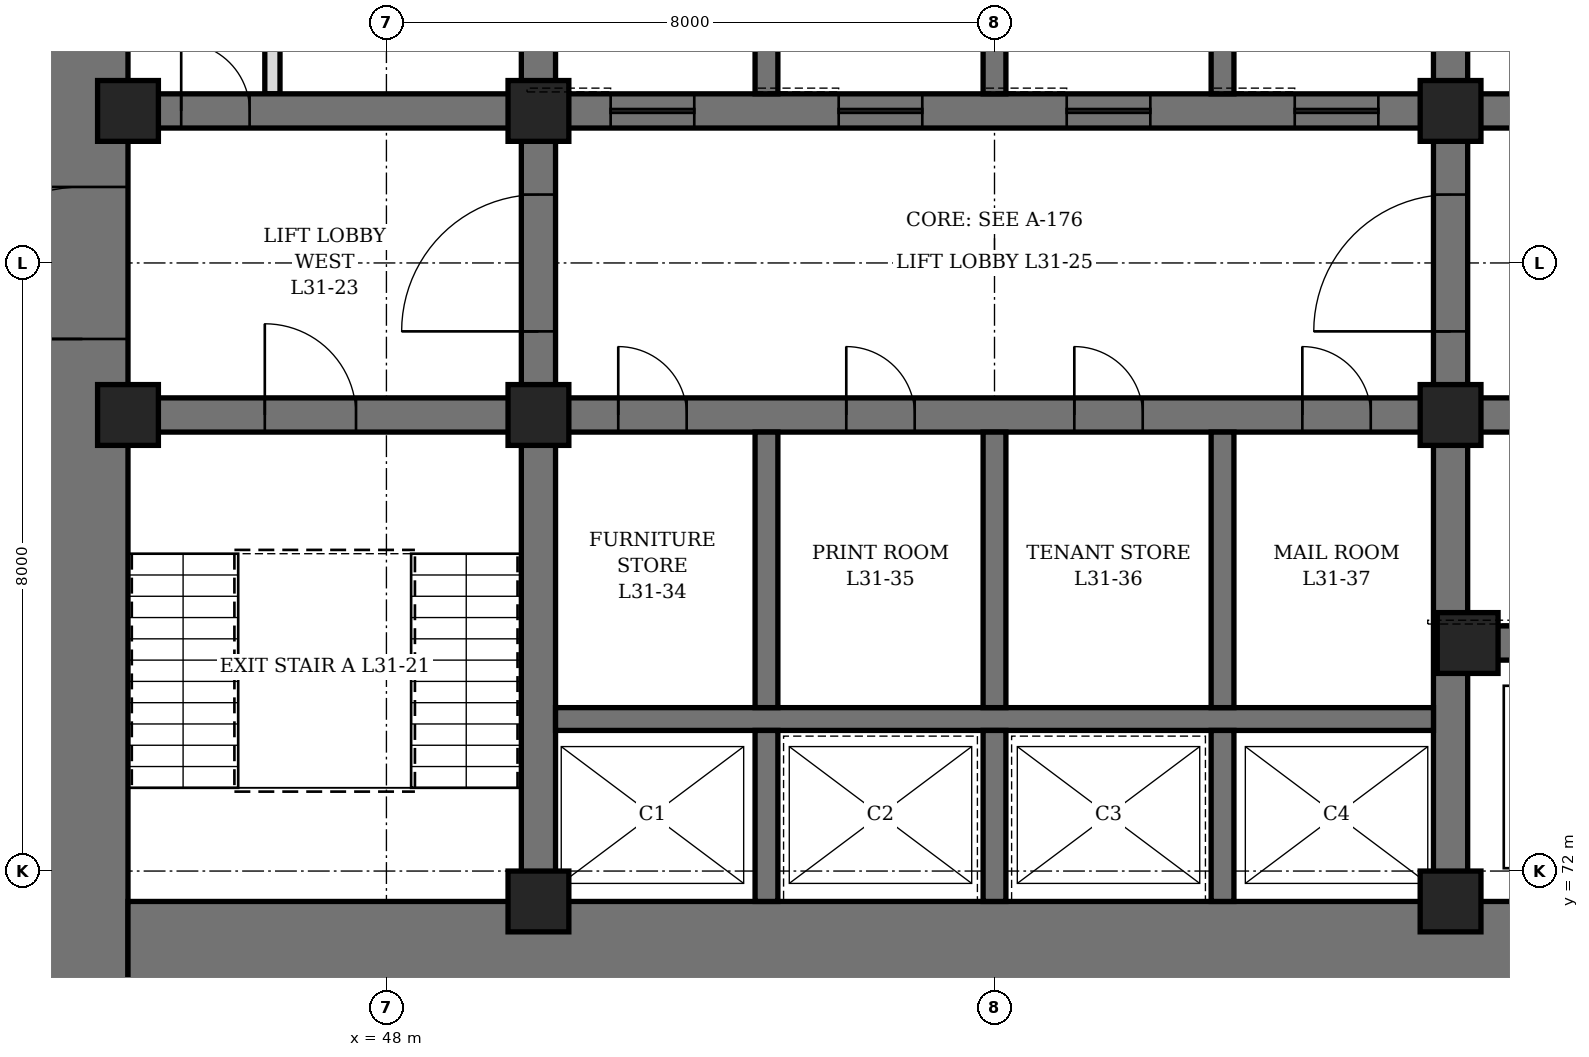
"""IFC4 building model, lengths in metres.
Left out: names, types, materials, properties, quantities, classifications, styles, units other than length and angle.
Written with IfcOpenShell. Run it as: python <this file> out.ifc"""

import sys

from ifc_helpers import new_model, si_unit, direction, frame, frame_2d, origin, origin_2d, place, context, subcontext, project, spatial, rectangle, hollow_rectangle, extrude, element, fill, save


model = new_model("IFC4")
c1 = context("Model", 3, precision=1e-05, world=origin(), true_north=direction((0.0, 1.0)))
c2 = subcontext(c1, "Body", "Model", "MODEL_VIEW")
j1 = project(units=[si_unit("LENGTHUNIT", "METRE"), si_unit("PLANEANGLEUNIT", "RADIAN")], contexts=[c1])
p1 = place(None, origin())
s1 = spatial("IfcSite", under=j1, at=p1, CompositionType="ELEMENT")
p2 = place(p1, origin())
s2 = spatial("IfcBuilding", under=s1, at=p2, CompositionType="ELEMENT")
p3 = place(p2, frame((0.0, 0.0, 141.7)))
s3 = spatial("IfcBuildingStorey", under=s2, at=p3, CompositionType="ELEMENT", Elevation=141.7)
p4 = place(p3, frame((44.0, 70.4, 0.0), z_axis=(0.0, 0.0, 1.0), x_axis=(0.0, 1.0, 0.0)))
e1 = element("IfcWall", 1, at=p4, inside=s3, PredefinedType="SHEAR", context=c2, shape_type="SweptSolid", body=[
    extrude(rectangle(XDim=19.2, YDim=1.2, at=frame_2d((9.6, 0.0))), origin(), (0.0, 0.0, 1.0), 4.2),
])
p5 = place(p4, frame((8.6, 0.0, 0.0)))
e2 = element("IfcOpeningElement", 2, at=p5, cuts=e1, PredefinedType="OPENING", context=c2, shape_type="SweptSolid", body=[
    extrude(rectangle(XDim=2.0, YDim=2.4, at=frame_2d((1.0, 1.2))), frame((0.0, 0.61, 0.0), z_axis=(0.0, -1.0, 0.0), x_axis=(1.0, 0.0, 0.0)), (0.0, 0.0, 1.0), 1.22),
])
p6 = place(p3, frame((44.6, 71.0, 0.0), z_axis=(0.0, 0.0, 1.0), x_axis=(1.0, 0.0, 0.0)))
e3 = element("IfcWall", 3, at=p6, inside=s3, PredefinedType="SHEAR", context=c2, shape_type="SweptSolid", body=[
    extrude(rectangle(XDim=22.8, YDim=1.2, at=frame_2d((11.4, 0.0))), origin(), (0.0, 0.0, 1.0), 4.2),
])
p7 = place(p3, frame((50.0, 71.6, 0.0), z_axis=(0.0, 0.0, 1.0), x_axis=(0.0, 1.0, 0.0)))
e4 = element("IfcWall", 4, at=p7, inside=s3, PredefinedType="SHEAR", context=c2, shape_type="SweptSolid", body=[
    extrude(rectangle(XDim=16.8, YDim=0.45, at=frame_2d((8.4, 0.0))), origin(), (0.0, 0.0, 1.0), 4.2),
])
p8 = place(p7, frame((7.5, 0.0, 0.0)))
e5 = element("IfcOpeningElement", 5, at=p8, cuts=e4, PredefinedType="OPENING", context=c2, shape_type="SweptSolid", body=[
    extrude(rectangle(XDim=1.8, YDim=2.4, at=frame_2d((0.9, 1.2))), frame((0.0, 0.235, 0.0), z_axis=(0.0, -1.0, 0.0), x_axis=(1.0, 0.0, 0.0)), (0.0, 0.0, 1.0), 0.47),
])
p9 = place(p3, frame((62.0, 71.6, 0.0), z_axis=(0.0, 0.0, 1.0), x_axis=(0.0, 1.0, 0.0)))
e6 = element("IfcWall", 6, at=p9, inside=s3, PredefinedType="SHEAR", context=c2, shape_type="SweptSolid", body=[
    extrude(rectangle(XDim=16.8, YDim=0.45, at=frame_2d((8.4, 0.0))), origin(), (0.0, 0.0, 1.0), 4.2),
])
p10 = place(p9, frame((7.5, 0.0, 0.0)))
e7 = element("IfcOpeningElement", 7, at=p10, cuts=e6, PredefinedType="OPENING", context=c2, shape_type="SweptSolid", body=[
    extrude(rectangle(XDim=1.8, YDim=2.4, at=frame_2d((0.9, 1.2))), frame((0.0, 0.235, 0.0), z_axis=(0.0, -1.0, 0.0), x_axis=(1.0, 0.0, 0.0)), (0.0, 0.0, 1.0), 0.47),
])
p11 = place(p3, frame((44.6, 78.0, 0.0), z_axis=(0.0, 0.0, 1.0), x_axis=(1.0, 0.0, 0.0)))
e8 = element("IfcWall", 8, at=p11, inside=s3, PredefinedType="SHEAR", context=c2, shape_type="SweptSolid", body=[
    extrude(rectangle(XDim=5.175, YDim=0.45, at=frame_2d((2.587, 0.0))), origin(), (0.0, 0.0, 1.0), 4.2),
])
p12 = place(p11, frame((1.8, 0.0, 0.0)))
e9 = element("IfcOpeningElement", 9, at=p12, cuts=e8, PredefinedType="OPENING", context=c2, shape_type="SweptSolid", body=[
    extrude(rectangle(XDim=1.2, YDim=2.1, at=frame_2d((0.6, 1.05))), frame((0.0, 0.235, 0.0), z_axis=(0.0, -1.0, 0.0), x_axis=(1.0, 0.0, 0.0)), (0.0, 0.0, 1.0), 0.47),
])
p13 = place(p3, frame((44.6, 82.0, 0.0), z_axis=(0.0, 0.0, 1.0), x_axis=(1.0, 0.0, 0.0)))
e10 = element("IfcWall", 10, at=p13, inside=s3, PredefinedType="SHEAR", context=c2, shape_type="SweptSolid", body=[
    extrude(rectangle(XDim=5.175, YDim=0.45, at=frame_2d((2.587, 0.0))), origin(), (0.0, 0.0, 1.0), 4.2),
])
p14 = place(p13, frame((0.7, 0.0, 0.0)))
e11 = element("IfcOpeningElement", 11, at=p14, cuts=e10, PredefinedType="OPENING", context=c2, shape_type="SweptSolid", body=[
    extrude(rectangle(XDim=0.9, YDim=2.1, at=frame_2d((0.45, 1.05))), frame((0.0, 0.235, 0.0), z_axis=(0.0, -1.0, 0.0), x_axis=(1.0, 0.0, 0.0)), (0.0, 0.0, 1.0), 0.47),
])
p15 = place(p3, frame((62.225, 75.0, 0.0), z_axis=(0.0, 0.0, 1.0), x_axis=(1.0, 0.0, 0.0)))
e12 = element("IfcWall", 12, at=p15, inside=s3, PredefinedType="SHEAR", context=c2, shape_type="SweptSolid", body=[
    extrude(rectangle(XDim=5.175, YDim=0.45, at=frame_2d((2.587, 0.0))), origin(), (0.0, 0.0, 1.0), 4.2),
])
p16 = place(p15, frame((0.675, 0.0, 0.0)))
e13 = element("IfcOpeningElement", 13, at=p16, cuts=e12, PredefinedType="OPENING", context=c2, shape_type="SweptSolid", body=[
    extrude(rectangle(XDim=1.2, YDim=2.2, at=frame_2d((0.6, 1.1))), frame((0.0, 0.235, 0.0), z_axis=(0.0, -1.0, 0.0), x_axis=(1.0, 0.0, 0.0)), (0.0, 0.0, 1.0), 0.47),
])
p17 = place(p15, frame((3.425, 0.0, 0.0)))
e14 = element("IfcOpeningElement", 14, at=p17, cuts=e12, PredefinedType="OPENING", context=c2, shape_type="SweptSolid", body=[
    extrude(rectangle(XDim=1.2, YDim=2.2, at=frame_2d((0.6, 1.1))), frame((0.0, 0.235, 0.0), z_axis=(0.0, -1.0, 0.0), x_axis=(1.0, 0.0, 0.0)), (0.0, 0.0, 1.0), 0.47),
])
p18 = place(p3, frame((62.225, 78.0, 0.0), z_axis=(0.0, 0.0, 1.0), x_axis=(1.0, 0.0, 0.0)))
e15 = element("IfcWall", 15, at=p18, inside=s3, PredefinedType="SHEAR", context=c2, shape_type="SweptSolid", body=[
    extrude(rectangle(XDim=5.175, YDim=0.45, at=frame_2d((2.587, 0.0))), origin(), (0.0, 0.0, 1.0), 4.2),
])
p19 = place(p18, frame((2.175, 0.0, 0.0)))
e16 = element("IfcOpeningElement", 16, at=p19, cuts=e15, PredefinedType="OPENING", context=c2, shape_type="SweptSolid", body=[
    extrude(rectangle(XDim=1.2, YDim=2.1, at=frame_2d((0.6, 1.05))), frame((0.0, 0.235, 0.0), z_axis=(0.0, -1.0, 0.0), x_axis=(1.0, 0.0, 0.0)), (0.0, 0.0, 1.0), 0.47),
])
p20 = place(p3, frame((62.225, 82.0, 0.0), z_axis=(0.0, 0.0, 1.0), x_axis=(1.0, 0.0, 0.0)))
e17 = element("IfcWall", 17, at=p20, inside=s3, PredefinedType="SHEAR", context=c2, shape_type="SweptSolid", body=[
    extrude(rectangle(XDim=5.175, YDim=0.45, at=frame_2d((2.587, 0.0))), origin(), (0.0, 0.0, 1.0), 4.2),
])
p21 = place(p20, frame((2.175, 0.0, 0.0)))
e18 = element("IfcOpeningElement", 18, at=p21, cuts=e17, PredefinedType="OPENING", context=c2, shape_type="SweptSolid", body=[
    extrude(rectangle(XDim=1.2, YDim=2.1, at=frame_2d((0.6, 1.05))), frame((0.0, 0.235, 0.0), z_axis=(0.0, -1.0, 0.0), x_axis=(1.0, 0.0, 0.0)), (0.0, 0.0, 1.0), 0.47),
])
p22 = place(p3, frame((50.225, 78.0, 0.0), z_axis=(0.0, 0.0, 1.0), x_axis=(1.0, 0.0, 0.0)))
e19 = element("IfcWall", 19, at=p22, inside=s3, PredefinedType="SHEAR", context=c2, shape_type="SweptSolid", body=[
    extrude(rectangle(XDim=11.55, YDim=0.45, at=frame_2d((5.775, 0.0))), origin(), (0.0, 0.0, 1.0), 4.2),
])
p23 = place(p22, frame((0.825, 0.0, 0.0)))
e20 = element("IfcOpeningElement", 20, at=p23, cuts=e19, PredefinedType="OPENING", context=c2, shape_type="SweptSolid", body=[
    extrude(rectangle(XDim=0.9, YDim=2.1, at=frame_2d((0.45, 1.05))), frame((0.0, 0.235, 0.0), z_axis=(0.0, -1.0, 0.0), x_axis=(1.0, 0.0, 0.0)), (0.0, 0.0, 1.0), 0.47),
])
p24 = place(p22, frame((3.825, 0.0, 0.0)))
e21 = element("IfcOpeningElement", 21, at=p24, cuts=e19, PredefinedType="OPENING", context=c2, shape_type="SweptSolid", body=[
    extrude(rectangle(XDim=0.9, YDim=2.1, at=frame_2d((0.45, 1.05))), frame((0.0, 0.235, 0.0), z_axis=(0.0, -1.0, 0.0), x_axis=(1.0, 0.0, 0.0)), (0.0, 0.0, 1.0), 0.47),
])
p25 = place(p22, frame((6.825, 0.0, 0.0)))
e22 = element("IfcOpeningElement", 22, at=p25, cuts=e19, PredefinedType="OPENING", context=c2, shape_type="SweptSolid", body=[
    extrude(rectangle(XDim=0.9, YDim=2.1, at=frame_2d((0.45, 1.05))), frame((0.0, 0.235, 0.0), z_axis=(0.0, -1.0, 0.0), x_axis=(1.0, 0.0, 0.0)), (0.0, 0.0, 1.0), 0.47),
])
p26 = place(p22, frame((9.825, 0.0, 0.0)))
e23 = element("IfcOpeningElement", 23, at=p26, cuts=e19, PredefinedType="OPENING", context=c2, shape_type="SweptSolid", body=[
    extrude(rectangle(XDim=0.9, YDim=2.1, at=frame_2d((0.45, 1.05))), frame((0.0, 0.235, 0.0), z_axis=(0.0, -1.0, 0.0), x_axis=(1.0, 0.0, 0.0)), (0.0, 0.0, 1.0), 0.47),
])
p27 = place(p3, frame((50.225, 82.0, 0.0), z_axis=(0.0, 0.0, 1.0), x_axis=(1.0, 0.0, 0.0)))
e24 = element("IfcWall", 24, at=p27, inside=s3, PredefinedType="SHEAR", context=c2, shape_type="SweptSolid", body=[
    extrude(rectangle(XDim=11.55, YDim=0.45, at=frame_2d((5.775, 0.0))), origin(), (0.0, 0.0, 1.0), 4.2),
])
p28 = place(p27, frame((0.725, 0.0, 0.0)))
e25 = element("IfcOpeningElement", 25, at=p28, cuts=e24, PredefinedType="OPENING", context=c2, shape_type="SweptSolid", body=[
    extrude(rectangle(XDim=1.1, YDim=2.2, at=frame_2d((0.55, 1.1))), frame((0.0, 0.235, 0.0), z_axis=(0.0, -1.0, 0.0), x_axis=(1.0, 0.0, 0.0)), (0.0, 0.0, 1.0), 0.47),
])
p29 = place(p27, frame((3.725, 0.0, 0.0)))
e26 = element("IfcOpeningElement", 26, at=p29, cuts=e24, PredefinedType="OPENING", context=c2, shape_type="SweptSolid", body=[
    extrude(rectangle(XDim=1.1, YDim=2.2, at=frame_2d((0.55, 1.1))), frame((0.0, 0.235, 0.0), z_axis=(0.0, -1.0, 0.0), x_axis=(1.0, 0.0, 0.0)), (0.0, 0.0, 1.0), 0.47),
])
p30 = place(p27, frame((6.725, 0.0, 0.0)))
e27 = element("IfcOpeningElement", 27, at=p30, cuts=e24, PredefinedType="OPENING", context=c2, shape_type="SweptSolid", body=[
    extrude(rectangle(XDim=1.1, YDim=2.2, at=frame_2d((0.55, 1.1))), frame((0.0, 0.235, 0.0), z_axis=(0.0, -1.0, 0.0), x_axis=(1.0, 0.0, 0.0)), (0.0, 0.0, 1.0), 0.47),
])
p31 = place(p27, frame((9.725, 0.0, 0.0)))
e28 = element("IfcOpeningElement", 28, at=p31, cuts=e24, PredefinedType="OPENING", context=c2, shape_type="SweptSolid", body=[
    extrude(rectangle(XDim=1.1, YDim=2.2, at=frame_2d((0.55, 1.1))), frame((0.0, 0.235, 0.0), z_axis=(0.0, -1.0, 0.0), x_axis=(1.0, 0.0, 0.0)), (0.0, 0.0, 1.0), 0.47),
])
p32 = place(p3, frame((50.225, 74.0, 0.0), z_axis=(0.0, 0.0, 1.0), x_axis=(1.0, 0.0, 0.0)))
e29 = element("IfcWall", 29, at=p32, inside=s3, PredefinedType="SHEAR", context=c2, shape_type="SweptSolid", body=[
    extrude(rectangle(XDim=11.55, YDim=0.3, at=frame_2d((5.775, 0.0))), origin(), (0.0, 0.0, 1.0), 4.2),
])
p33 = place(p3, frame((53.0, 71.6, 0.0), z_axis=(0.0, 0.0, 1.0), x_axis=(0.0, 1.0, 0.0)))
e30 = element("IfcWall", 30, at=p33, inside=s3, PredefinedType="SHEAR", context=c2, shape_type="SweptSolid", body=[
    extrude(rectangle(XDim=2.25, YDim=0.3, at=frame_2d((1.125, 0.0))), origin(), (0.0, 0.0, 1.0), 4.2),
])
p34 = place(p3, frame((53.0, 74.15, 0.0), z_axis=(0.0, 0.0, 1.0), x_axis=(0.0, 1.0, 0.0)))
e31 = element("IfcWall", 31, at=p34, inside=s3, PredefinedType="SHEAR", context=c2, shape_type="SweptSolid", body=[
    extrude(rectangle(XDim=3.625, YDim=0.3, at=frame_2d((1.812, 0.0))), origin(), (0.0, 0.0, 1.0), 4.2),
])
p35 = place(p3, frame((53.0, 82.225, 0.0), z_axis=(0.0, 0.0, 1.0), x_axis=(0.0, 1.0, 0.0)))
e32 = element("IfcWall", 32, at=p35, inside=s3, PredefinedType="SHEAR", context=c2, shape_type="SweptSolid", body=[
    extrude(rectangle(XDim=3.55, YDim=0.3, at=frame_2d((1.775, 0.0))), origin(), (0.0, 0.0, 1.0), 4.2),
])
p36 = place(p3, frame((56.0, 71.6, 0.0), z_axis=(0.0, 0.0, 1.0), x_axis=(0.0, 1.0, 0.0)))
e33 = element("IfcWall", 33, at=p36, inside=s3, PredefinedType="SHEAR", context=c2, shape_type="SweptSolid", body=[
    extrude(rectangle(XDim=2.25, YDim=0.3, at=frame_2d((1.125, 0.0))), origin(), (0.0, 0.0, 1.0), 4.2),
])
p37 = place(p3, frame((56.0, 74.15, 0.0), z_axis=(0.0, 0.0, 1.0), x_axis=(0.0, 1.0, 0.0)))
e34 = element("IfcWall", 34, at=p37, inside=s3, PredefinedType="SHEAR", context=c2, shape_type="SweptSolid", body=[
    extrude(rectangle(XDim=3.625, YDim=0.3, at=frame_2d((1.812, 0.0))), origin(), (0.0, 0.0, 1.0), 4.2),
])
p38 = place(p3, frame((56.0, 82.225, 0.0), z_axis=(0.0, 0.0, 1.0), x_axis=(0.0, 1.0, 0.0)))
e35 = element("IfcWall", 35, at=p38, inside=s3, PredefinedType="SHEAR", context=c2, shape_type="SweptSolid", body=[
    extrude(rectangle(XDim=3.55, YDim=0.3, at=frame_2d((1.775, 0.0))), origin(), (0.0, 0.0, 1.0), 4.2),
])
p39 = place(p3, frame((59.0, 71.6, 0.0), z_axis=(0.0, 0.0, 1.0), x_axis=(0.0, 1.0, 0.0)))
e36 = element("IfcWall", 36, at=p39, inside=s3, PredefinedType="SHEAR", context=c2, shape_type="SweptSolid", body=[
    extrude(rectangle(XDim=2.25, YDim=0.3, at=frame_2d((1.125, 0.0))), origin(), (0.0, 0.0, 1.0), 4.2),
])
p40 = place(p3, frame((59.0, 74.15, 0.0), z_axis=(0.0, 0.0, 1.0), x_axis=(0.0, 1.0, 0.0)))
e37 = element("IfcWall", 37, at=p40, inside=s3, PredefinedType="SHEAR", context=c2, shape_type="SweptSolid", body=[
    extrude(rectangle(XDim=3.625, YDim=0.3, at=frame_2d((1.812, 0.0))), origin(), (0.0, 0.0, 1.0), 4.2),
])
p41 = place(p3, frame((59.0, 82.225, 0.0), z_axis=(0.0, 0.0, 1.0), x_axis=(0.0, 1.0, 0.0)))
e38 = element("IfcWall", 38, at=p41, inside=s3, PredefinedType="SHEAR", context=c2, shape_type="SweptSolid", body=[
    extrude(rectangle(XDim=3.55, YDim=0.3, at=frame_2d((1.775, 0.0))), origin(), (0.0, 0.0, 1.0), 4.2),
])
for number, where, z_axis, x_axis in (
    (39, (44.6, 78.0, 0.0), (0.0, 0.0, 1.0), (1.0, 0.0, 0.0)),
    (40, (44.6, 82.0, 0.0), (0.0, 0.0, 1.0), (1.0, 0.0, 0.0)),
    (41, (50.0, 71.6, 0.0), (0.0, 0.0, 1.0), (1.0, 0.0, 0.0)),
    (42, (50.0, 78.0, 0.0), (0.0, 0.0, 1.0), (1.0, 0.0, 0.0)),
    (43, (50.0, 82.0, 0.0), (0.0, 0.0, 1.0), (1.0, 0.0, 0.0)),
    (44, (62.0, 71.6, 0.0), (0.0, 0.0, 1.0), (1.0, 0.0, 0.0)),
    (45, (62.0, 78.0, 0.0), (0.0, 0.0, 1.0), (1.0, 0.0, 0.0)),
    (46, (62.0, 82.0, 0.0), (0.0, 0.0, 1.0), (1.0, 0.0, 0.0)),
    (47, (62.225, 75.0, 0.0), (0.0, 0.0, 1.0), (1.0, 0.0, 0.0)),
):
    element("IfcColumn", number, at=place(p3, frame(where, z_axis=z_axis, x_axis=x_axis)), inside=s3, PredefinedType="COLUMN", context=c2, shape_type="SweptSolid", body=[
        extrude(hollow_rectangle(XDim=0.8, YDim=0.8, WallThickness=0.1, at=origin_2d()), origin(), (0.0, 0.0, 1.0), 4.2),
    ])
p42 = place(p3, frame((46.5, 82.225, 0.0), z_axis=(0.0, 0.0, 1.0), x_axis=(0.0, 1.0, 0.0)))
e48 = element("IfcWall", 48, at=p42, inside=s3, PredefinedType="PARTITIONING", context=c2, shape_type="SweptSolid", body=[
    extrude(rectangle(XDim=3.05, YDim=0.2, at=frame_2d((1.525, 0.0))), origin(), (0.0, 0.0, 1.0), 4.04),
])
p43 = place(p42, frame((1.075, 0.0, 0.0)))
e49 = element("IfcOpeningElement", 49, at=p43, cuts=e48, PredefinedType="OPENING", context=c2, shape_type="SweptSolid", body=[
    extrude(rectangle(XDim=0.9, YDim=2.1, at=frame_2d((0.45, 1.05))), frame((0.0, 0.11, 0.0), z_axis=(0.0, -1.0, 0.0), x_axis=(1.0, 0.0, 0.0)), (0.0, 0.0, 1.0), 0.22),
])
p44 = place(p14, origin())
e50 = element("IfcDoor", 50, at=p44, inside=s3, OperationType="SINGLE_SWING_LEFT", PredefinedType="DOOR", context=c2, shape_type="SweptSolid", body=[
    extrude(rectangle(XDim=0.9, YDim=2.1, at=frame_2d((0.45, 1.05))), frame((0.0, 0.225, 0.0), z_axis=(0.0, -1.0, 0.0), x_axis=(1.0, 0.0, 0.0)), (0.0, 0.0, 1.0), 0.449),
])
fill(e11, e50)
p45 = place(p23, origin())
e51 = element("IfcDoor", 51, at=p45, inside=s3, OperationType="SINGLE_SWING_LEFT", PredefinedType="DOOR", context=c2, shape_type="SweptSolid", body=[
    extrude(rectangle(XDim=0.9, YDim=2.1, at=frame_2d((0.45, 1.05))), frame((0.0, 0.225, 0.0), z_axis=(0.0, -1.0, 0.0), x_axis=(1.0, 0.0, 0.0)), (0.0, 0.0, 1.0), 0.449),
])
fill(e20, e51)
p46 = place(p24, origin())
e52 = element("IfcDoor", 52, at=p46, inside=s3, OperationType="SINGLE_SWING_LEFT", PredefinedType="DOOR", context=c2, shape_type="SweptSolid", body=[
    extrude(rectangle(XDim=0.9, YDim=2.1, at=frame_2d((0.45, 1.05))), frame((0.0, 0.225, 0.0), z_axis=(0.0, -1.0, 0.0), x_axis=(1.0, 0.0, 0.0)), (0.0, 0.0, 1.0), 0.449),
])
fill(e21, e52)
p47 = place(p25, origin())
e53 = element("IfcDoor", 53, at=p47, inside=s3, OperationType="SINGLE_SWING_LEFT", PredefinedType="DOOR", context=c2, shape_type="SweptSolid", body=[
    extrude(rectangle(XDim=0.9, YDim=2.1, at=frame_2d((0.45, 1.05))), frame((0.0, 0.225, 0.0), z_axis=(0.0, -1.0, 0.0), x_axis=(1.0, 0.0, 0.0)), (0.0, 0.0, 1.0), 0.449),
])
fill(e22, e53)
p48 = place(p26, origin())
e54 = element("IfcDoor", 54, at=p48, inside=s3, OperationType="SINGLE_SWING_LEFT", PredefinedType="DOOR", context=c2, shape_type="SweptSolid", body=[
    extrude(rectangle(XDim=0.9, YDim=2.1, at=frame_2d((0.45, 1.05))), frame((0.0, 0.225, 0.0), z_axis=(0.0, -1.0, 0.0), x_axis=(1.0, 0.0, 0.0)), (0.0, 0.0, 1.0), 0.449),
])
fill(e23, e54)
p49 = place(p12, origin())
e55 = element("IfcDoor", 55, at=p49, inside=s3, OperationType="SINGLE_SWING_LEFT", PredefinedType="DOOR", context=c2, shape_type="SweptSolid", body=[
    extrude(rectangle(XDim=1.2, YDim=2.1, at=frame_2d((0.6, 1.05))), frame((0.0, 0.225, 0.0), z_axis=(0.0, -1.0, 0.0), x_axis=(1.0, 0.0, 0.0)), (0.0, 0.0, 1.0), 0.449),
])
fill(e9, e55)
p50 = place(p5, origin())
e56 = element("IfcDoor", 56, at=p50, inside=s3, OperationType="DOUBLE_DOOR_SINGLE_SWING", PredefinedType="DOOR", context=c2, shape_type="SweptSolid", body=[
    extrude(rectangle(XDim=2.0, YDim=2.4, at=frame_2d((1.0, 1.2))), frame((0.0, 0.35, 0.0), z_axis=(0.0, -1.0, 0.0), x_axis=(1.0, 0.0, 0.0)), (0.0, 0.0, 1.0), 0.7),
])
fill(e2, e56)
p51 = place(p8, origin())
e57 = element("IfcDoor", 57, at=p51, inside=s3, OperationType="DOUBLE_DOOR_SINGLE_SWING", PredefinedType="DOOR", context=c2, shape_type="SweptSolid", body=[
    extrude(rectangle(XDim=1.8, YDim=2.4, at=frame_2d((0.9, 1.2))), frame((0.0, 0.225, 0.0), z_axis=(0.0, -1.0, 0.0), x_axis=(1.0, 0.0, 0.0)), (0.0, 0.0, 1.0), 0.449),
])
fill(e5, e57)
p52 = place(p10, origin())
e58 = element("IfcDoor", 58, at=p52, inside=s3, OperationType="DOUBLE_DOOR_SINGLE_SWING", PredefinedType="DOOR", context=c2, shape_type="SweptSolid", body=[
    extrude(rectangle(XDim=1.8, YDim=2.4, at=frame_2d((0.9, 1.2))), frame((0.0, 0.225, 0.0), z_axis=(0.0, -1.0, 0.0), x_axis=(1.0, 0.0, 0.0)), (0.0, 0.0, 1.0), 0.449),
])
fill(e7, e58)
p53 = place(p28, origin())
e59 = element("IfcDoor", 59, at=p53, inside=s3, OperationType="SLIDING_TO_LEFT", PredefinedType="DOOR", context=c2, shape_type="SweptSolid", body=[
    extrude(rectangle(XDim=1.1, YDim=2.2, at=frame_2d((0.55, 1.1))), frame((0.0, 0.225, 0.0), z_axis=(0.0, -1.0, 0.0), x_axis=(1.0, 0.0, 0.0)), (0.0, 0.0, 1.0), 0.449),
])
fill(e25, e59)
p54 = place(p29, origin())
e60 = element("IfcDoor", 60, at=p54, inside=s3, OperationType="SLIDING_TO_LEFT", PredefinedType="DOOR", context=c2, shape_type="SweptSolid", body=[
    extrude(rectangle(XDim=1.1, YDim=2.2, at=frame_2d((0.55, 1.1))), frame((0.0, 0.225, 0.0), z_axis=(0.0, -1.0, 0.0), x_axis=(1.0, 0.0, 0.0)), (0.0, 0.0, 1.0), 0.449),
])
fill(e26, e60)
p55 = place(p30, origin())
e61 = element("IfcDoor", 61, at=p55, inside=s3, OperationType="SLIDING_TO_LEFT", PredefinedType="DOOR", context=c2, shape_type="SweptSolid", body=[
    extrude(rectangle(XDim=1.1, YDim=2.2, at=frame_2d((0.55, 1.1))), frame((0.0, 0.225, 0.0), z_axis=(0.0, -1.0, 0.0), x_axis=(1.0, 0.0, 0.0)), (0.0, 0.0, 1.0), 0.449),
])
fill(e27, e61)
p56 = place(p31, origin())
e62 = element("IfcDoor", 62, at=p56, inside=s3, OperationType="SLIDING_TO_LEFT", PredefinedType="DOOR", context=c2, shape_type="SweptSolid", body=[
    extrude(rectangle(XDim=1.1, YDim=2.2, at=frame_2d((0.55, 1.1))), frame((0.0, 0.225, 0.0), z_axis=(0.0, -1.0, 0.0), x_axis=(1.0, 0.0, 0.0)), (0.0, 0.0, 1.0), 0.449),
])
fill(e28, e62)
save(model, sys.argv[1])
